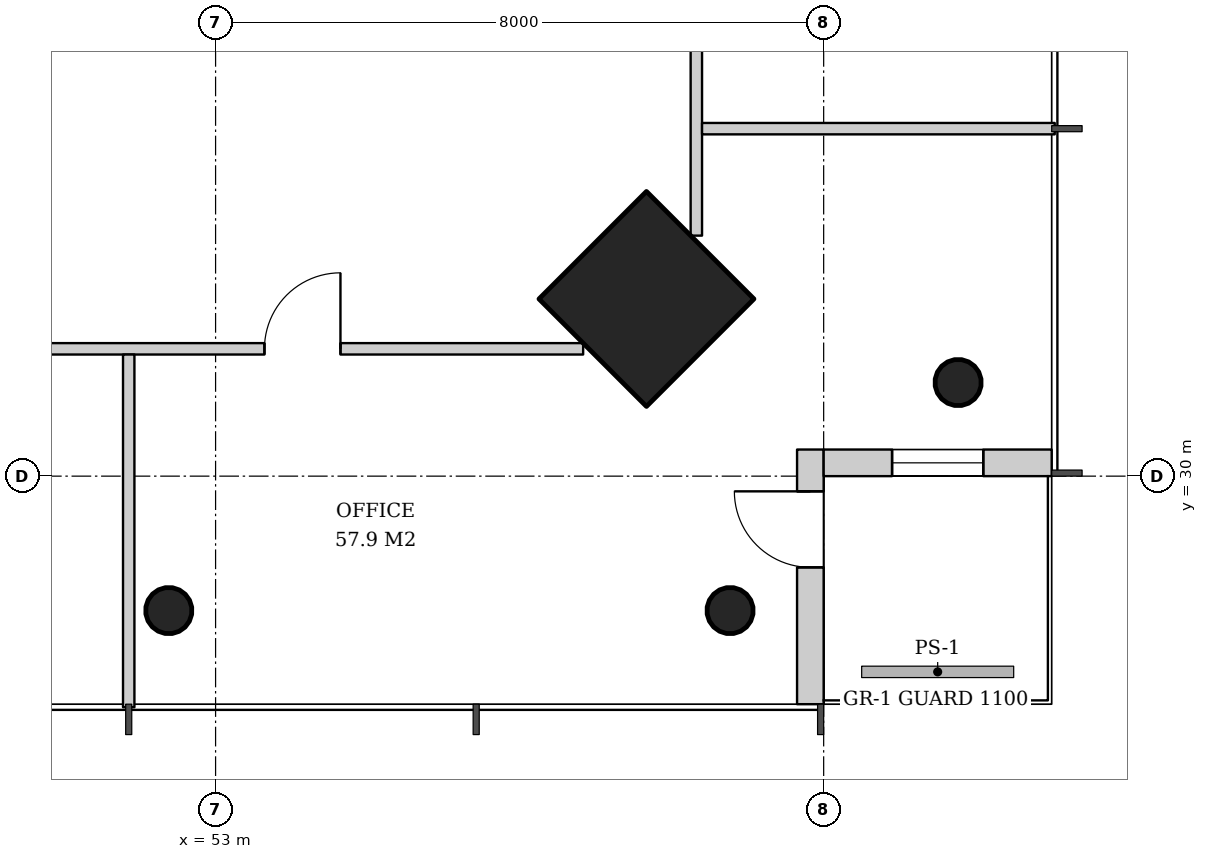
"""IFC4 building model, lengths in metres.
Left out: names, types, materials, properties, quantities, classifications, styles, units other than length and angle.
Written with IfcOpenShell. Run it as: python <this file> out.ifc"""

import sys

from ifc_helpers import new_model, si_unit, direction, frame, frame_2d, origin, origin_2d, place, context, subcontext, project, spatial, rectangle, hollow_circle, extrude, element, fill, save


model = new_model("IFC4")
c1 = context("Model", 3, precision=1e-05, world=origin(), true_north=direction((0.0, 1.0)))
c2 = subcontext(c1, "Body", "Model", "MODEL_VIEW")
j1 = project(units=[si_unit("LENGTHUNIT", "METRE"), si_unit("PLANEANGLEUNIT", "RADIAN")], contexts=[c1])
p1 = place(None, origin())
s1 = spatial("IfcSite", under=j1, at=p1, CompositionType="ELEMENT")
p2 = place(p1, origin())
s2 = spatial("IfcBuilding", under=s1, at=p2, CompositionType="ELEMENT")
p3 = place(p2, frame((0.0, 0.0, 214.8)))
s3 = spatial("IfcBuildingStorey", under=s2, at=p3, CompositionType="ELEMENT", Elevation=214.8)
p4 = place(p3, frame((62.807, 31.193, 0.0), z_axis=(-0.031898107953, 0.031898107953, 0.998981992539), x_axis=(-0.707106781187, -0.707106781187, 0.0)))
e1 = element("IfcColumn", 1, at=p4, inside=s3, PredefinedType="COLUMN", context=c2, shape_type="SweptSolid", body=[
    extrude(hollow_circle(Radius=0.305, WallThickness=0.025, at=origin_2d()), origin(), (0.0, 0.0, 1.0), 3.804),
])
p5 = place(p3, frame((58.707, 32.293, 0.0), z_axis=(-0.031898107953, 0.031898107953, 0.998981992539), x_axis=(-0.707106781187, -0.707106781187, 0.0)))
e2 = element("IfcColumn", 2, at=p5, inside=s3, PredefinedType="COLUMN", context=c2, shape_type="SweptSolid", body=[
    extrude(rectangle(XDim=2.0, YDim=2.0, at=origin_2d()), origin(), (0.0, 0.0, 1.0), 3.804),
])
p6 = place(p3, frame((59.807, 28.193, 0.0), z_axis=(-0.031898107953, 0.031898107953, 0.998981992539), x_axis=(-0.707106781187, -0.707106781187, 0.0)))
e3 = element("IfcColumn", 3, at=p6, inside=s3, PredefinedType="COLUMN", context=c2, shape_type="SweptSolid", body=[
    extrude(hollow_circle(Radius=0.305, WallThickness=0.025, at=origin_2d()), origin(), (0.0, 0.0, 1.0), 3.804),
])
p7 = place(p3, frame((52.404, 28.193, 0.0), z_axis=(-0.015987237665, 0.031910269556, 0.999362868496), x_axis=(-0.894067115991, -0.447933021895, 0.0)))
e4 = element("IfcColumn", 4, at=p7, inside=s3, PredefinedType="COLUMN", context=c2, shape_type="SweptSolid", body=[
    extrude(hollow_circle(Radius=0.305, WallThickness=0.025, at=origin_2d()), origin(), (0.0, 0.0, 1.0), 3.802),
])
p8 = place(p3, frame((60.825, 27.0, 0.0), z_axis=(0.0, 0.0, 1.0), x_axis=(0.0, 1.0, 0.0)))
e5 = element("IfcWall", 5, at=p8, inside=s3, PredefinedType="SOLIDWALL", context=c2, shape_type="SweptSolid", body=[
    extrude(rectangle(XDim=3.35, YDim=0.35, at=frame_2d((1.675, 0.0))), origin(), (0.0, 0.0, 1.0), 3.62),
])
p9 = place(p8, frame((1.8, 0.0, 0.0)))
e6 = element("IfcOpeningElement", 6, at=p9, cuts=e5, PredefinedType="OPENING", context=c2, shape_type="SweptSolid", body=[
    extrude(rectangle(XDim=1.0, YDim=2.4, at=frame_2d((0.5, 1.2))), frame((0.0, 0.185, 0.0), z_axis=(0.0, -1.0, 0.0), x_axis=(1.0, 0.0, 0.0)), (0.0, 0.0, 1.0), 0.37),
])
p10 = place(p3, frame((61.0, 30.175, 0.0), z_axis=(0.0, 0.0, 1.0), x_axis=(1.0, 0.0, 0.0)))
e7 = element("IfcWall", 7, at=p10, inside=s3, PredefinedType="SOLIDWALL", context=c2, shape_type="SweptSolid", body=[
    extrude(rectangle(XDim=3.0, YDim=0.35, at=frame_2d((1.5, 0.0))), origin(), (0.0, 0.0, 1.0), 3.62),
])
p11 = place(p10, frame((0.9, 0.0, 0.6)))
e8 = element("IfcOpeningElement", 8, at=p11, cuts=e7, PredefinedType="OPENING", context=c2, shape_type="SweptSolid", body=[
    extrude(rectangle(XDim=1.2, YDim=2.55, at=frame_2d((0.6, 1.275))), frame((0.0, 0.185, 0.0), z_axis=(0.0, -1.0, 0.0), x_axis=(1.0, 0.0, 0.0)), (0.0, 0.0, 1.0), 0.37),
])
p12 = place(p3, frame((59.325, 33.164, 0.0), z_axis=(0.0, 0.0, 1.0), x_axis=(0.0, 1.0, 0.0)))
e9 = element("IfcWall", 9, at=p12, inside=s3, PredefinedType="PARTITIONING", context=c2, shape_type="SweptSolid", body=[
    extrude(rectangle(XDim=25.671, YDim=0.15, at=frame_2d((12.836, 0.0))), origin(), (0.0, 0.0, 1.0), 2.867),
])
p13 = place(p12, frame((3.193, 0.0, 0.0)))
e10 = element("IfcOpeningElement", 10, at=p13, cuts=e9, PredefinedType="OPENING", context=c2, shape_type="SweptSolid", body=[
    extrude(rectangle(XDim=1.0, YDim=2.1, at=frame_2d((0.5, 1.05))), frame((0.0, 0.085, 0.0), z_axis=(0.0, -1.0, 0.0), x_axis=(1.0, 0.0, 0.0)), (0.0, 0.0, 1.0), 0.17),
])
p14 = place(p12, frame((7.764, 0.0, 0.0)))
e11 = element("IfcOpeningElement", 11, at=p14, cuts=e9, PredefinedType="OPENING", context=c2, shape_type="SweptSolid", body=[
    extrude(rectangle(XDim=1.0, YDim=2.1, at=frame_2d((0.5, 1.05))), frame((0.0, 0.085, 0.0), z_axis=(0.0, -1.0, 0.0), x_axis=(1.0, 0.0, 0.0)), (0.0, 0.0, 1.0), 0.17),
])
p15 = place(p12, frame((12.336, 0.0, 0.0)))
e12 = element("IfcOpeningElement", 12, at=p15, cuts=e9, PredefinedType="OPENING", context=c2, shape_type="SweptSolid", body=[
    extrude(rectangle(XDim=1.0, YDim=2.1, at=frame_2d((0.5, 1.05))), frame((0.0, 0.085, 0.0), z_axis=(0.0, -1.0, 0.0), x_axis=(1.0, 0.0, 0.0)), (0.0, 0.0, 1.0), 0.17),
])
p16 = place(p12, frame((16.907, 0.0, 0.0)))
e13 = element("IfcOpeningElement", 13, at=p16, cuts=e9, PredefinedType="OPENING", context=c2, shape_type="SweptSolid", body=[
    extrude(rectangle(XDim=1.0, YDim=2.1, at=frame_2d((0.5, 1.05))), frame((0.0, 0.085, 0.0), z_axis=(0.0, -1.0, 0.0), x_axis=(1.0, 0.0, 0.0)), (0.0, 0.0, 1.0), 0.17),
])
p17 = place(p12, frame((21.479, 0.0, 0.0)))
e14 = element("IfcOpeningElement", 14, at=p17, cuts=e9, PredefinedType="OPENING", context=c2, shape_type="SweptSolid", body=[
    extrude(rectangle(XDim=1.0, YDim=2.1, at=frame_2d((0.5, 1.05))), frame((0.0, 0.085, 0.0), z_axis=(0.0, -1.0, 0.0), x_axis=(1.0, 0.0, 0.0)), (0.0, 0.0, 1.0), 0.17),
])
p18 = place(p3, frame((59.4, 34.572, 0.0), z_axis=(0.0, 0.0, 1.0), x_axis=(1.0, 0.0, 0.0)))
e15 = element("IfcWall", 15, at=p18, inside=s3, PredefinedType="PARTITIONING", context=c2, shape_type="SweptSolid", body=[
    extrude(rectangle(XDim=4.64, YDim=0.15, at=frame_2d((2.32, 0.0))), origin(), (0.0, 0.0, 1.0), 3.12),
])
p19 = place(p3, frame((32.164, 31.675, 0.0), z_axis=(0.0, 0.0, 1.0), x_axis=(1.0, 0.0, 0.0)))
e16 = element("IfcWall", 16, at=p19, inside=s3, PredefinedType="PARTITIONING", context=c2, shape_type="SweptSolid", body=[
    extrude(rectangle(XDim=25.671, YDim=0.15, at=frame_2d((12.836, 0.0))), origin(), (0.0, 0.0, 1.0), 2.867),
])
p20 = place(p19, frame((3.193, 0.0, 0.0)))
e17 = element("IfcOpeningElement", 17, at=p20, cuts=e16, PredefinedType="OPENING", context=c2, shape_type="SweptSolid", body=[
    extrude(rectangle(XDim=1.0, YDim=2.1, at=frame_2d((0.5, 1.05))), frame((0.0, 0.085, 0.0), z_axis=(0.0, -1.0, 0.0), x_axis=(1.0, 0.0, 0.0)), (0.0, 0.0, 1.0), 0.17),
])
p21 = place(p19, frame((7.764, 0.0, 0.0)))
e18 = element("IfcOpeningElement", 18, at=p21, cuts=e16, PredefinedType="OPENING", context=c2, shape_type="SweptSolid", body=[
    extrude(rectangle(XDim=1.0, YDim=2.1, at=frame_2d((0.5, 1.05))), frame((0.0, 0.085, 0.0), z_axis=(0.0, -1.0, 0.0), x_axis=(1.0, 0.0, 0.0)), (0.0, 0.0, 1.0), 0.17),
])
p22 = place(p19, frame((12.336, 0.0, 0.0)))
e19 = element("IfcOpeningElement", 19, at=p22, cuts=e16, PredefinedType="OPENING", context=c2, shape_type="SweptSolid", body=[
    extrude(rectangle(XDim=1.0, YDim=2.1, at=frame_2d((0.5, 1.05))), frame((0.0, 0.085, 0.0), z_axis=(0.0, -1.0, 0.0), x_axis=(1.0, 0.0, 0.0)), (0.0, 0.0, 1.0), 0.17),
])
p23 = place(p19, frame((16.907, 0.0, 0.0)))
e20 = element("IfcOpeningElement", 20, at=p23, cuts=e16, PredefinedType="OPENING", context=c2, shape_type="SweptSolid", body=[
    extrude(rectangle(XDim=1.0, YDim=2.1, at=frame_2d((0.5, 1.05))), frame((0.0, 0.085, 0.0), z_axis=(0.0, -1.0, 0.0), x_axis=(1.0, 0.0, 0.0)), (0.0, 0.0, 1.0), 0.17),
])
p24 = place(p19, frame((21.479, 0.0, 0.0)))
e21 = element("IfcOpeningElement", 21, at=p24, cuts=e16, PredefinedType="OPENING", context=c2, shape_type="SweptSolid", body=[
    extrude(rectangle(XDim=1.0, YDim=2.1, at=frame_2d((0.5, 1.05))), frame((0.0, 0.085, 0.0), z_axis=(0.0, -1.0, 0.0), x_axis=(1.0, 0.0, 0.0)), (0.0, 0.0, 1.0), 0.17),
])
p25 = place(p3, frame((51.857, 31.6, 0.0), z_axis=(0.0, 0.0, 1.0), x_axis=(0.0, -1.0, 0.0)))
e22 = element("IfcWall", 22, at=p25, inside=s3, PredefinedType="PARTITIONING", context=c2, shape_type="SweptSolid", body=[
    extrude(rectangle(XDim=4.64, YDim=0.15, at=frame_2d((2.32, 0.0))), origin(), (0.0, 0.0, 1.0), 3.12),
])
p26 = place(p9, origin())
e23 = element("IfcDoor", 23, at=p26, inside=s3, OperationType="SINGLE_SWING_RIGHT", PredefinedType="DOOR", context=c2, shape_type="SweptSolid", body=[
    extrude(rectangle(XDim=1.0, YDim=2.4, at=frame_2d((0.5, 1.2))), frame((0.0, 0.025, 0.0), z_axis=(0.0, -1.0, 0.0), x_axis=(1.0, 0.0, 0.0)), (0.0, 0.0, 1.0), 0.05),
])
fill(e6, e23)
p27 = place(p11, origin())
e24 = element("IfcWindow", 24, at=p27, inside=s3, PartitioningType="SINGLE_PANEL", PredefinedType="WINDOW", context=c2, shape_type="SweptSolid", body=[
    extrude(rectangle(XDim=1.2, YDim=2.55, at=frame_2d((0.6, 1.275))), frame((0.0, 0.03, 0.0), z_axis=(0.0, -1.0, 0.0), x_axis=(1.0, 0.0, 0.0)), (0.0, 0.0, 1.0), 0.06),
])
fill(e8, e24)
p28 = place(p24, origin())
e25 = element("IfcDoor", 25, at=p28, inside=s3, OperationType="SINGLE_SWING_RIGHT", PredefinedType="DOOR", context=c2, shape_type="SweptSolid", body=[
    extrude(rectangle(XDim=1.0, YDim=2.1, at=frame_2d((0.5, 1.05))), frame((0.0, 0.025, 0.0), z_axis=(0.0, -1.0, 0.0), x_axis=(1.0, 0.0, 0.0)), (0.0, 0.0, 1.0), 0.05),
])
fill(e21, e25)
save(model, sys.argv[1])
